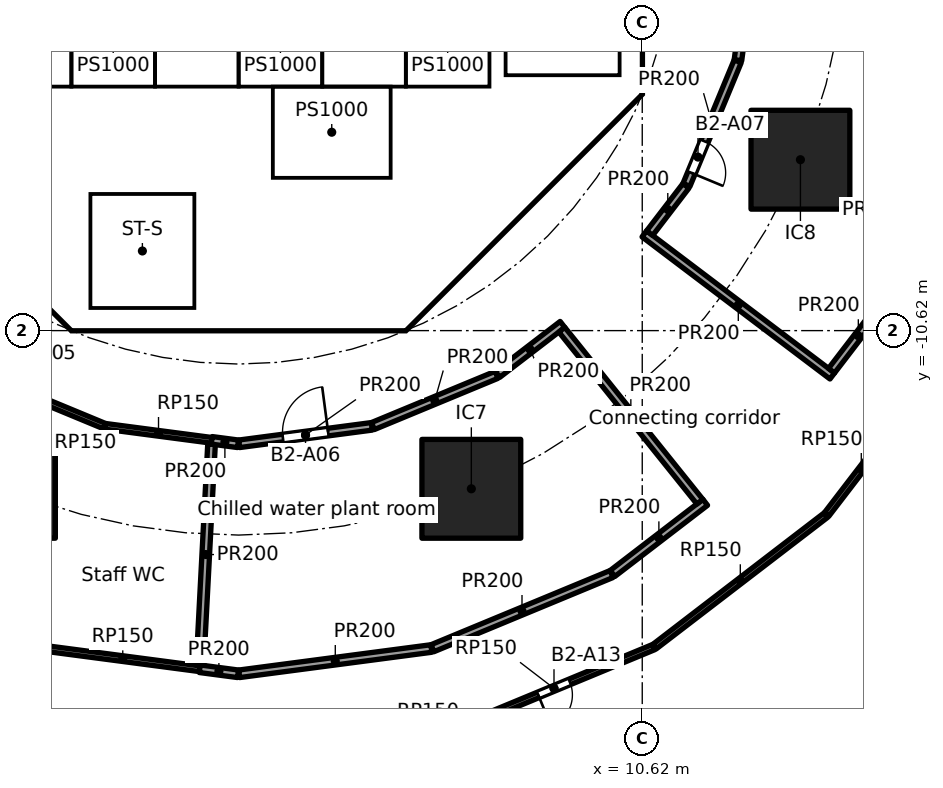
"""IFC4 building model, lengths in metres.
Left out: names, types, materials, properties, quantities, classifications, styles, units other than length and angle.
Written with IfcOpenShell. Run it as: python <this file> out.ifc"""

import sys

from ifc_helpers import new_model, si_unit, direction, frame, frame_2d, origin, origin_2d, place, context, subcontext, project, spatial, polyline, rectangle, outline, extrude, element, fill, save


model = new_model("IFC4")
c1 = context("Model", 3, precision=1e-05, world=origin(), true_north=direction((0.0, 1.0)))
c2 = subcontext(c1, "Body", "Model", "MODEL_VIEW")
j1 = project(units=[si_unit("LENGTHUNIT", "METRE"), si_unit("PLANEANGLEUNIT", "RADIAN")], contexts=[c1])
p1 = place(None, origin())
s1 = spatial("IfcSite", under=j1, at=p1, CompositionType="ELEMENT")
p2 = place(p1, origin())
s2 = spatial("IfcBuilding", under=s1, at=p2, CompositionType="ELEMENT")
p3 = place(p2, frame((0.0, 0.0, -10.0)))
s3 = spatial("IfcBuildingStorey", under=s2, at=p3, CompositionType="ELEMENT", Elevation=-10.0)
for number, where, z_axis, x_axis in (
    (1, (-6.123, -14.782, 0.0), (0.0, 0.0, 1.0), (1.0, 0.0, 0.0)),
    (2, (6.123, -14.782, 0.0), (0.0, 0.0, 1.0), (1.0, 0.0, 0.0)),
    (3, (14.782, -6.123, 0.0), (0.0, 0.0, 1.0), (1.0, 0.0, 0.0)),
):
    element("IfcColumn", number, at=place(p3, frame(where, z_axis=z_axis, x_axis=x_axis)), inside=s3, PredefinedType="COLUMN", context=c2, shape_type="SweptSolid", body=[
        extrude(rectangle(XDim=2.6, YDim=2.6, at=origin_2d()), origin(), (0.0, 0.0, 1.0), 5.0),
    ])
p4 = place(p3, frame((-9.988, -4.613, 0.0), z_axis=(0.0, 0.0, 1.0), x_axis=(0.707106781187, -0.707106781187, 0.0)))
e4 = element("IfcWall", 4, at=p4, inside=s3, PredefinedType="SHEAR", context=c2, shape_type="SweptSolid", body=[
    extrude(rectangle(XDim=7.602, YDim=0.6, at=frame_2d((3.801, 0.0))), origin(), (0.0, 0.0, 1.0), 4.6),
])
p5 = place(p4, frame((6.151, 0.0, 0.0)))
e5 = element("IfcOpeningElement", 5, at=p5, cuts=e4, PredefinedType="OPENING", context=c2, shape_type="SweptSolid", body=[
    extrude(rectangle(XDim=1.1, YDim=2.1, at=frame_2d((0.55, 1.05))), frame((0.0, 0.31, 0.0), z_axis=(0.0, -1.0, 0.0), x_axis=(1.0, 0.0, 0.0)), (0.0, 0.0, 1.0), 0.62),
])
p6 = place(p3, frame((4.613, -9.988, 0.0), z_axis=(0.0, 0.0, 1.0), x_axis=(0.707106781187, 0.707106781187, 0.0)))
e6 = element("IfcWall", 6, at=p6, inside=s3, PredefinedType="SHEAR", context=c2, shape_type="SweptSolid", body=[
    extrude(rectangle(XDim=7.602, YDim=0.6, at=frame_2d((3.801, 0.0))), origin(), (0.0, 0.0, 1.0), 4.6),
])
p7 = place(p6, frame((3.201, 0.0, 0.0)))
e7 = element("IfcOpeningElement", 7, at=p7, cuts=e6, PredefinedType="OPENING", context=c2, shape_type="SweptSolid", body=[
    extrude(rectangle(XDim=1.2, YDim=2.1, at=frame_2d((0.6, 1.05))), frame((0.0, 0.31, 0.0), z_axis=(0.0, -1.0, 0.0), x_axis=(1.0, 0.0, 0.0)), (0.0, 0.0, 1.0), 0.62),
])
p8 = place(p3, frame((4.0, -10.025, 0.0), z_axis=(0.0, 0.0, 1.0), x_axis=(0.0, 1.0, 0.0)))
e8 = element("IfcWall", 8, at=p8, inside=s3, PredefinedType="SOLIDWALL", context=c2, shape_type="SweptSolid", body=[
    extrude(rectangle(XDim=3.0, YDim=0.2, at=frame_2d((1.5, 0.0))), origin(), (0.0, 0.0, 1.0), 4.6),
])
p9 = place(p8, frame((0.975, 0.0, 0.0)))
e9 = element("IfcOpeningElement", 9, at=p9, cuts=e8, PredefinedType="OPENING", context=c2, shape_type="SweptSolid", body=[
    extrude(rectangle(XDim=1.1, YDim=2.1, at=frame_2d((0.55, 1.05))), frame((0.0, 0.11, 0.0), z_axis=(0.0, -1.0, 0.0), x_axis=(1.0, 0.0, 0.0)), (0.0, 0.0, 1.0), 0.22),
])
p10 = place(p3, frame((4.0, -6.5, 0.0), z_axis=(0.0, 0.0, 1.0), x_axis=(0.0, 1.0, 0.0)))
e10 = element("IfcWall", 10, at=p10, inside=s3, PredefinedType="SOLIDWALL", context=c2, shape_type="SweptSolid", body=[
    extrude(rectangle(XDim=2.2, YDim=0.2, at=frame_2d((1.1, 0.0))), origin(), (0.0, 0.0, 1.0), 4.6),
])
p11 = place(p10, frame((0.55, 0.0, 0.0)))
e11 = element("IfcOpeningElement", 11, at=p11, cuts=e10, PredefinedType="OPENING", context=c2, shape_type="SweptSolid", body=[
    extrude(rectangle(XDim=1.1, YDim=2.1, at=frame_2d((0.55, 1.05))), frame((0.0, 0.11, 0.0), z_axis=(0.0, -1.0, 0.0), x_axis=(1.0, 0.0, 0.0)), (0.0, 0.0, 1.0), 0.22),
])
p12 = place(p3, frame((-4.0, -6.5, 0.0), z_axis=(0.0, 0.0, 1.0), x_axis=(0.0, 1.0, 0.0)))
e12 = element("IfcWall", 12, at=p12, inside=s3, PredefinedType="SOLIDWALL", context=c2, shape_type="SweptSolid", body=[
    extrude(rectangle(XDim=2.2, YDim=0.2, at=frame_2d((1.1, 0.0))), origin(), (0.0, 0.0, 1.0), 4.6),
])
p13 = place(p12, frame((0.65, 0.0, 0.0)))
e13 = element("IfcOpeningElement", 13, at=p13, cuts=e12, PredefinedType="OPENING", context=c2, shape_type="SweptSolid", body=[
    extrude(rectangle(XDim=0.9, YDim=2.1, at=frame_2d((0.45, 1.05))), frame((0.0, 0.11, 0.0), z_axis=(0.0, -1.0, 0.0), x_axis=(1.0, 0.0, 0.0)), (0.0, 0.0, 1.0), 0.22),
])
p14 = place(p3, origin())
e14 = element("IfcWall", 14, at=p14, inside=s3, PredefinedType="SHEAR", context=c2, shape_type="SweptSolid", body=[
    extrude(outline(polyline([(-4.152, -10.025), (4.152, -10.025), (4.401, -9.776), (4.825, -10.2), (4.401, -10.625), (-4.401, -10.625), (-4.825, -10.2), (-4.401, -9.776), (-4.152, -10.025)])), origin(), (0.0, 0.0, 1.0), 4.6),
])
p15 = place(p3, origin())
e15 = element("IfcWall", 15, at=p15, inside=s3, PredefinedType="SHEAR", context=c2, shape_type="SweptSolid", body=[
    extrude(outline(polyline([(9.776, -4.401), (10.025, -4.152), (10.025, -3.801), (10.025, 4.152), (9.776, 4.401), (10.2, 4.825), (10.625, 4.401), (10.625, -4.401), (10.2, -4.825), (9.776, -4.401)])), origin(), (0.0, 0.0, 1.0), 4.6),
])
for number, where, z_axis, x_axis in (
    (16, (-0.9, -6.5, 0.0), (0.0, 0.0, 1.0), (0.0, 1.0, 0.0)),
    (17, (0.9, -6.5, 0.0), (0.0, 0.0, 1.0), (0.0, 1.0, 0.0)),
):
    element("IfcWall", number, at=place(p3, frame(where, z_axis=z_axis, x_axis=x_axis)), inside=s3, PredefinedType="SOLIDWALL", context=c2, shape_type="SweptSolid", body=[
        extrude(rectangle(XDim=2.2, YDim=0.2, at=frame_2d((1.1, 0.0))), origin(), (0.0, 0.0, 1.0), 4.6),
    ])
p16 = place(p3, origin())
e18 = element("IfcWall", 18, at=p16, inside=s3, PredefinedType="SOLIDWALL", context=c2, shape_type="SweptSolid", body=[
    extrude(outline(polyline([(-6.7, -2.1), (-6.5, -2.1), (-6.5, -4.1), (-4.5, -4.1), (-4.5, -2.1), (-4.3, -2.1), (-4.3, -4.1), (-2.3, -4.1), (-2.3, -2.1), (-2.1, -2.1), (-2.1, -4.1), (-0.1, -4.1), (-0.1, -2.1), (0.1, -2.1), (0.1, -4.1), (2.1, -4.1), (2.1, -2.1), (2.3, -2.1), (2.3, -4.1), (4.3, -4.1), (4.3, -2.1), (4.5, -2.1), (4.5, -4.1), (6.5, -4.1), (6.5, -2.1), (6.7, -2.1), (6.7, -4.3), (-6.7, -4.3), (-6.7, -2.1)])), origin(), (0.0, 0.0, 1.0), 4.6),
])
p17 = place(p3, origin())
e19 = element("IfcWall", 19, at=p17, inside=s3, PredefinedType="SOLIDWALL", context=c2, shape_type="SweptSolid", body=[
    extrude(outline(polyline([(-3.9, -10.025), (-4.1, -10.025), (-4.1, -7.025), (-3.9, -7.025), (-3.9, -10.025)])), origin(), (0.0, 0.0, 1.0), 4.6),
])
p18 = place(p3, origin())
e20 = element("IfcWall", 20, at=p18, inside=s3, PredefinedType="SOLIDWALL", context=c2, shape_type="SweptSolid", body=[
    extrude(outline(polyline([(4.1, -7.025), (-4.1, -7.025), (-4.1, -6.5), (4.1, -6.5), (4.1, -7.025)])), origin(), (0.0, 0.0, 1.0), 4.6),
])
p19 = place(p3, origin())
e21 = element("IfcWall", 21, at=p19, inside=s3, PredefinedType="SOLIDWALL", context=c2, shape_type="SweptSolid", body=[
    extrude(outline(polyline([(7.025, -3.9), (6.7, -3.9), (6.7, 3.9), (7.025, 3.9), (7.025, -3.9)])), origin(), (0.0, 0.0, 1.0), 4.6),
])
p20 = place(p3, origin())
e22 = element("IfcWall", 22, at=p20, inside=s3, PredefinedType="SOLIDWALL", context=c2, shape_type="SweptSolid", body=[
    extrude(outline(polyline([(10.025, -4.1), (6.7, -4.1), (6.7, -3.9), (10.025, -3.9), (10.025, -4.1)])), origin(), (0.0, 0.0, 1.0), 4.6),
])
p21 = place(p3, frame((0.0, 0.0, -2.0)))
e23 = element("IfcWall", 23, at=p21, inside=s3, PredefinedType="SOLIDWALL", context=c2, shape_type="SweptSolid", body=[
    extrude(outline(polyline([(-4.4, -4.2), (-6.6, -4.2), (-6.6, -2.0), (-4.4, -2.0), (-4.4, -4.2)]), holes=[polyline([(-4.5, -4.1), (-4.5, -2.1), (-6.5, -2.1), (-6.5, -4.1), (-4.5, -4.1)])]), origin(), (0.0, 0.0, 1.0), 2.0),
])
p22 = place(p3, frame((0.0, 0.0, -2.0)))
e24 = element("IfcWall", 24, at=p22, inside=s3, PredefinedType="SOLIDWALL", context=c2, shape_type="SweptSolid", body=[
    extrude(outline(polyline([(-2.2, -4.2), (-4.4, -4.2), (-4.4, -2.0), (-2.2, -2.0), (-2.2, -4.2)]), holes=[polyline([(-2.3, -4.1), (-2.3, -2.1), (-4.3, -2.1), (-4.3, -4.1), (-2.3, -4.1)])]), origin(), (0.0, 0.0, 1.0), 2.0),
])
p23 = place(p3, frame((0.0, 0.0, -2.0)))
e25 = element("IfcWall", 25, at=p23, inside=s3, PredefinedType="SOLIDWALL", context=c2, shape_type="SweptSolid", body=[
    extrude(outline(polyline([(0.0, -4.2), (-2.2, -4.2), (-2.2, -2.0), (0.0, -2.0), (0.0, -4.2)]), holes=[polyline([(-0.1, -4.1), (-0.1, -2.1), (-2.1, -2.1), (-2.1, -4.1), (-0.1, -4.1)])]), origin(), (0.0, 0.0, 1.0), 2.0),
])
p24 = place(p3, frame((0.0, 0.0, -2.0)))
e26 = element("IfcWall", 26, at=p24, inside=s3, PredefinedType="SOLIDWALL", context=c2, shape_type="SweptSolid", body=[
    extrude(outline(polyline([(2.2, -4.2), (0.0, -4.2), (0.0, -2.0), (2.2, -2.0), (2.2, -4.2)]), holes=[polyline([(2.1, -4.1), (2.1, -2.1), (0.1, -2.1), (0.1, -4.1), (2.1, -4.1)])]), origin(), (0.0, 0.0, 1.0), 2.0),
])
p25 = place(p3, frame((0.0, 0.0, -2.0)))
e27 = element("IfcWall", 27, at=p25, inside=s3, PredefinedType="SOLIDWALL", context=c2, shape_type="SweptSolid", body=[
    extrude(outline(polyline([(4.4, -4.2), (2.2, -4.2), (2.2, -2.0), (4.4, -2.0), (4.4, -4.2)]), holes=[polyline([(4.3, -4.1), (4.3, -2.1), (2.3, -2.1), (2.3, -4.1), (4.3, -4.1)])]), origin(), (0.0, 0.0, 1.0), 2.0),
])
p26 = place(p3, frame((0.0, 0.0, -2.0)))
e28 = element("IfcWall", 28, at=p26, inside=s3, PredefinedType="SOLIDWALL", context=c2, shape_type="SweptSolid", body=[
    extrude(outline(polyline([(6.6, -4.2), (4.4, -4.2), (4.4, -2.0), (6.6, -2.0), (6.6, -4.2)]), holes=[polyline([(6.5, -4.1), (6.5, -2.1), (4.5, -2.1), (4.5, -4.1), (6.5, -4.1)])]), origin(), (0.0, 0.0, 1.0), 2.0),
])
p27 = place(p3, frame((0.0, 0.0, -2.0)))
e29 = element("IfcWall", 29, at=p27, inside=s3, PredefinedType="SOLIDWALL", context=c2, shape_type="SweptSolid", body=[
    extrude(outline(polyline([(4.0, -6.6), (0.9, -6.6), (0.9, -4.2), (4.0, -4.2), (4.0, -6.6)]), holes=[polyline([(3.9, -6.5), (3.9, -4.3), (1.0, -4.3), (1.0, -6.5), (3.9, -6.5)])]), origin(), (0.0, 0.0, 1.0), 2.0),
])
p28 = place(p3, frame((-5.074, -18.984, 0.0), z_axis=(0.0, 0.0, 1.0), x_axis=(0.991443107789, -0.13053951133, 0.0)))
e30 = element("IfcWall", 30, at=p28, inside=s3, PredefinedType="PARTITIONING", context=c2, shape_type="SweptSolid", body=[
    extrude(rectangle(XDim=4.086, YDim=0.15, at=frame_2d((2.043, 0.0))), origin(), (0.0, 0.0, 1.0), 4.6),
])
p29 = place(p3, frame((-3.531, -13.132, 0.0), z_axis=(0.0, 0.0, 1.0), x_axis=(-0.923881838111, 0.382677866108, 0.0)))
e31 = element("IfcWall", 31, at=p29, inside=s3, PredefinedType="PARTITIONING", context=c2, shape_type="SweptSolid", body=[
    extrude(rectangle(XDim=3.527, YDim=0.15, at=frame_2d((1.763, 0.0))), origin(), (0.0, 0.0, 1.0), 4.6),
])
p30 = place(p29, frame((2.281, 0.0, 0.0)))
e32 = element("IfcOpeningElement", 32, at=p30, cuts=e31, PredefinedType="OPENING", context=c2, shape_type="SweptSolid", body=[
    extrude(rectangle(XDim=0.9, YDim=2.1, at=frame_2d((0.45, 1.05))), frame((0.0, 0.085, 0.0), z_axis=(0.0, -1.0, 0.0), x_axis=(1.0, 0.0, 0.0)), (0.0, 0.0, 1.0), 0.17),
])
p31 = place(p3, frame((-0.708, -13.507, 0.0), z_axis=(0.0, 0.0, 1.0), x_axis=(-0.991443994311, 0.130532778046, 0.0)))
e33 = element("IfcWall", 33, at=p31, inside=s3, PredefinedType="PARTITIONING", context=c2, shape_type="SweptSolid", body=[
    extrude(rectangle(XDim=2.824, YDim=0.15, at=frame_2d((1.412, 0.0))), origin(), (0.0, 0.0, 1.0), 4.6),
])
p32 = place(p3, frame((10.924, -18.945, 0.0), z_axis=(0.0, 0.0, 1.0), x_axis=(-0.923876568882, -0.38269058712, 0.0)))
e34 = element("IfcWall", 34, at=p32, inside=s3, PredefinedType="PARTITIONING", context=c2, shape_type="SweptSolid", body=[
    extrude(rectangle(XDim=5.686, YDim=0.15, at=frame_2d((2.843, 0.0))), origin(), (0.0, 0.0, 1.0), 4.6),
])
p33 = place(p32, frame((2.393, 0.0, 0.0)))
e35 = element("IfcOpeningElement", 35, at=p33, cuts=e34, PredefinedType="OPENING", context=c2, shape_type="SweptSolid", body=[
    extrude(rectangle(XDim=0.9, YDim=2.1, at=frame_2d((0.45, 1.05))), frame((0.0, 0.085, 0.0), z_axis=(0.0, -1.0, 0.0), x_axis=(1.0, 0.0, 0.0)), (0.0, 0.0, 1.0), 0.17),
])
p34 = place(p3, frame((15.456, -15.472, 0.0), z_axis=(0.0, 0.0, 1.0), x_axis=(-0.793356107398, -0.608757822828, 0.0)))
e36 = element("IfcWall", 36, at=p34, inside=s3, PredefinedType="PARTITIONING", context=c2, shape_type="SweptSolid", body=[
    extrude(rectangle(XDim=5.686, YDim=0.15, at=frame_2d((2.843, 0.0))), origin(), (0.0, 0.0, 1.0), 4.6),
])
p35 = place(p3, frame((17.295, -13.08, 0.0), z_axis=(0.0, 0.0, 1.0), x_axis=(-0.608756728417, -0.79335694716, 0.0)))
e37 = element("IfcWall", 37, at=p35, inside=s3, PredefinedType="PARTITIONING", context=c2, shape_type="SweptSolid", body=[
    extrude(rectangle(XDim=2.994, YDim=0.15, at=frame_2d((1.497, 0.0))), origin(), (0.0, 0.0, 1.0), 4.6),
])
p36 = place(p3, frame((-1.023, -19.517, 0.0), z_axis=(0.0, 0.0, 1.0), x_axis=(0.991428116695, -0.130653317704, 0.0)))
e38 = element("IfcWall", 38, at=p36, inside=s3, PredefinedType="PARTITIONING", context=c2, shape_type="SweptSolid", body=[
    extrude(rectangle(XDim=1.017, YDim=0.2, at=frame_2d((0.508, 0.0))), origin(), (0.0, 0.0, 1.0), 4.6),
])
p37 = place(p3, frame((-0.713, -13.607, 0.0), z_axis=(0.0, 0.0, 1.0), x_axis=(-0.052327572808, -0.998629974077, 0.0)))
e39 = element("IfcWall", 39, at=p37, inside=s3, PredefinedType="PARTITIONING", context=c2, shape_type="SweptSolid", body=[
    extrude(rectangle(XDim=5.818, YDim=0.2, at=frame_2d((2.909, 0.0))), origin(), (0.0, 0.0, 1.0), 4.6),
])
p38 = place(p3, frame((0.015, -19.65, 0.0), z_axis=(0.0, 0.0, 1.0), x_axis=(0.991441907417, 0.13054862779, 0.0)))
e40 = element("IfcWall", 40, at=p38, inside=s3, PredefinedType="PARTITIONING", context=c2, shape_type="SweptSolid", body=[
    extrude(rectangle(XDim=5.1, YDim=0.2, at=frame_2d((2.55, 0.0))), origin(), (0.0, 0.0, 1.0), 4.6),
])
p39 = place(p3, frame((-0.015, -13.598, 0.0), z_axis=(0.0, 0.0, 1.0), x_axis=(-0.991473310532, 0.130309917135, 0.0)))
e41 = element("IfcWall", 41, at=p39, inside=s3, PredefinedType="PARTITIONING", context=c2, shape_type="SweptSolid", body=[
    extrude(rectangle(XDim=0.699, YDim=0.2, at=frame_2d((0.349, 0.0))), origin(), (0.0, 0.0, 1.0), 4.6),
])
p40 = place(p3, frame((3.505, -13.139, 0.0), z_axis=(0.0, 0.0, 1.0), x_axis=(-0.991452406768, -0.130468866457, 0.0)))
e42 = element("IfcWall", 42, at=p40, inside=s3, PredefinedType="PARTITIONING", context=c2, shape_type="SweptSolid", body=[
    extrude(rectangle(XDim=3.52, YDim=0.2, at=frame_2d((1.76, 0.0))), origin(), (0.0, 0.0, 1.0), 4.6),
])
p41 = place(p40, frame((1.16, 0.0, 0.0)))
e43 = element("IfcOpeningElement", 43, at=p41, cuts=e42, PredefinedType="OPENING", context=c2, shape_type="SweptSolid", body=[
    extrude(rectangle(XDim=1.2, YDim=2.1, at=frame_2d((0.6, 1.05))), frame((0.0, 0.11, 0.0), z_axis=(0.0, -1.0, 0.0), x_axis=(1.0, 0.0, 0.0)), (0.0, 0.0, 1.0), 0.22),
])
p42 = place(p3, frame((5.1, -18.976, 0.0), z_axis=(0.0, 0.0, 1.0), x_axis=(0.9238779676, 0.382687210373, 0.0)))
e44 = element("IfcWall", 44, at=p42, inside=s3, PredefinedType="PARTITIONING", context=c2, shape_type="SweptSolid", body=[
    extrude(rectangle(XDim=5.1, YDim=0.2, at=frame_2d((2.55, 0.0))), origin(), (0.0, 0.0, 1.0), 4.6),
])
p43 = place(p3, frame((6.786, -11.784, 0.0), z_axis=(0.0, 0.0, 1.0), x_axis=(-0.92386297064, -0.382723413813, 0.0)))
e45 = element("IfcWall", 45, at=p43, inside=s3, PredefinedType="PARTITIONING", context=c2, shape_type="SweptSolid", body=[
    extrude(rectangle(XDim=3.52, YDim=0.2, at=frame_2d((1.76, 0.0))), origin(), (0.0, 0.0, 1.0), 4.6),
])
p44 = place(p3, frame((8.521, -10.457, 0.0), z_axis=(0.0, 0.0, 1.0), x_axis=(-0.793411148419, -0.608686084582, 0.0)))
e46 = element("IfcWall", 46, at=p44, inside=s3, PredefinedType="PARTITIONING", context=c2, shape_type="SweptSolid", body=[
    extrude(rectangle(XDim=2.154, YDim=0.2, at=frame_2d((1.077, 0.0))), origin(), (0.0, 0.0, 1.0), 4.6),
])
p45 = place(p3, frame((9.838, -17.01, 0.0), z_axis=(0.0, 0.0, 1.0), x_axis=(0.793349451978, 0.608766496324, 0.0)))
e47 = element("IfcWall", 47, at=p45, inside=s3, PredefinedType="PARTITIONING", context=c2, shape_type="SweptSolid", body=[
    extrude(rectangle(XDim=3.075, YDim=0.2, at=frame_2d((1.538, 0.0))), origin(), (0.0, 0.0, 1.0), 4.6),
])
p46 = place(p3, frame((10.675, -8.073, 0.0), z_axis=(0.0, 0.0, 1.0), x_axis=(0.797578930951, -0.603214596062, 0.0)))
e48 = element("IfcWall", 48, at=p46, inside=s3, PredefinedType="PARTITIONING", context=c2, shape_type="SweptSolid", body=[
    extrude(rectangle(XDim=6.2, YDim=0.2, at=frame_2d((3.1, 0.0))), origin(), (0.0, 0.0, 1.0), 4.6),
])
p47 = place(p3, frame((11.769, -6.812, 0.0), z_axis=(0.0, 0.0, 1.0), x_axis=(-0.608670453571, -0.793423139913, 0.0)))
e49 = element("IfcWall", 49, at=p47, inside=s3, PredefinedType="PARTITIONING", context=c2, shape_type="SweptSolid", body=[
    extrude(rectangle(XDim=1.566, YDim=0.2, at=frame_2d((0.783, 0.0))), origin(), (0.0, 0.0, 1.0), 4.6),
])
p48 = place(p3, frame((12.136, -15.121, 0.0), z_axis=(0.0, 0.0, 1.0), x_axis=(-0.625936206577, 0.779874262491, 0.0)))
e50 = element("IfcWall", 50, at=p48, inside=s3, PredefinedType="PARTITIONING", context=c2, shape_type="SweptSolid", body=[
    extrude(rectangle(XDim=5.802, YDim=0.2, at=frame_2d((2.901, 0.0))), origin(), (0.0, 0.0, 1.0), 4.6),
])
p49 = place(p3, frame((13.131, -3.534, 0.0), z_axis=(0.0, 0.0, 1.0), x_axis=(-0.382723413813, -0.92386297064, 0.0)))
e51 = element("IfcWall", 51, at=p49, inside=s3, PredefinedType="PARTITIONING", context=c2, shape_type="SweptSolid", body=[
    extrude(rectangle(XDim=3.52, YDim=0.2, at=frame_2d((1.76, 0.0))), origin(), (0.0, 0.0, 1.0), 4.6),
])
p50 = place(p49, frame((2.278, 0.0, 0.0)))
e52 = element("IfcOpeningElement", 52, at=p50, cuts=e51, PredefinedType="OPENING", context=c2, shape_type="SweptSolid", body=[
    extrude(rectangle(XDim=0.9, YDim=2.1, at=frame_2d((0.45, 1.05))), frame((0.0, 0.11, 0.0), z_axis=(0.0, -1.0, 0.0), x_axis=(1.0, 0.0, 0.0)), (0.0, 0.0, 1.0), 0.22),
])
p51 = place(p3, frame((13.598, -0.015, 0.0), z_axis=(0.0, 0.0, 1.0), x_axis=(-0.130468866457, -0.991452406768, 0.0)))
e53 = element("IfcWall", 53, at=p51, inside=s3, PredefinedType="PARTITIONING", context=c2, shape_type="SweptSolid", body=[
    extrude(rectangle(XDim=3.52, YDim=0.2, at=frame_2d((1.76, 0.0))), origin(), (0.0, 0.0, 1.0), 4.6),
])
p52 = place(p3, frame((15.601, -11.674, 0.0), z_axis=(0.0, 0.0, 1.0), x_axis=(0.608741577542, 0.793368572463, 0.0)))
e54 = element("IfcWall", 54, at=p52, inside=s3, PredefinedType="PARTITIONING", context=c2, shape_type="SweptSolid", body=[
    extrude(rectangle(XDim=2.314, YDim=0.2, at=frame_2d((1.157, 0.0))), origin(), (0.0, 0.0, 1.0), 4.6),
])
p53 = place(p11, origin())
e55 = element("IfcDoor", 55, at=p53, inside=s3, OperationType="DOUBLE_DOOR_SLIDING", PredefinedType="DOOR", context=c2, shape_type="SweptSolid", body=[
    extrude(rectangle(XDim=1.1, YDim=2.1, at=frame_2d((0.55, 1.05))), frame((0.0, 0.025, 0.0), z_axis=(0.0, -1.0, 0.0), x_axis=(1.0, 0.0, 0.0)), (0.0, 0.0, 1.0), 0.05),
])
fill(e11, e55)
p54 = place(p9, origin())
e56 = element("IfcDoor", 56, at=p54, inside=s3, OperationType="SINGLE_SWING_RIGHT", PredefinedType="DOOR", context=c2, shape_type="SweptSolid", body=[
    extrude(rectangle(XDim=1.1, YDim=2.1, at=frame_2d((0.55, 1.05))), frame((0.0, 0.025, 0.0), z_axis=(0.0, -1.0, 0.0), x_axis=(1.0, 0.0, 0.0)), (0.0, 0.0, 1.0), 0.05),
])
fill(e9, e56)
p55 = place(p13, frame((0.9, 0.0, 0.0), x_axis=(-1.0, 0.0, 0.0)))
e57 = element("IfcDoor", 57, at=p55, inside=s3, OperationType="SINGLE_SWING_LEFT", PredefinedType="DOOR", context=c2, shape_type="SweptSolid", body=[
    extrude(rectangle(XDim=0.9, YDim=2.1, at=frame_2d((0.45, 1.05))), frame((0.0, 0.025, 0.0), z_axis=(0.0, -1.0, 0.0), x_axis=(1.0, 0.0, 0.0)), (0.0, 0.0, 1.0), 0.05),
])
fill(e13, e57)
p56 = place(p7, origin())
e58 = element("IfcDoor", 58, at=p56, inside=s3, OperationType="SINGLE_SWING_LEFT", PredefinedType="DOOR", context=c2, shape_type="SweptSolid", body=[
    extrude(rectangle(XDim=1.2, YDim=2.1, at=frame_2d((0.6, 1.05))), frame((0.0, 0.025, 0.0), z_axis=(0.0, -1.0, 0.0), x_axis=(1.0, 0.0, 0.0)), (0.0, 0.0, 1.0), 0.05),
])
fill(e7, e58)
p57 = place(p5, origin())
e59 = element("IfcDoor", 59, at=p57, inside=s3, OperationType="SINGLE_SWING_LEFT", PredefinedType="DOOR", context=c2, shape_type="SweptSolid", body=[
    extrude(rectangle(XDim=1.1, YDim=2.1, at=frame_2d((0.55, 1.05))), frame((0.0, 0.025, 0.0), z_axis=(0.0, -1.0, 0.0), x_axis=(1.0, 0.0, 0.0)), (0.0, 0.0, 1.0), 0.05),
])
fill(e5, e59)
p58 = place(p41, frame((1.2, 0.0, 0.0), x_axis=(-1.0, 0.0, 0.0)))
e60 = element("IfcDoor", 60, at=p58, inside=s3, OperationType="SINGLE_SWING_RIGHT", PredefinedType="DOOR", context=c2, shape_type="SweptSolid", body=[
    extrude(rectangle(XDim=1.2, YDim=2.1, at=frame_2d((0.6, 1.05))), frame((0.0, 0.025, 0.0), z_axis=(0.0, -1.0, 0.0), x_axis=(1.0, 0.0, 0.0)), (0.0, 0.0, 1.0), 0.05),
])
fill(e43, e60)
p59 = place(p50, origin())
e61 = element("IfcDoor", 61, at=p59, inside=s3, OperationType="SINGLE_SWING_RIGHT", PredefinedType="DOOR", context=c2, shape_type="SweptSolid", body=[
    extrude(rectangle(XDim=0.9, YDim=2.1, at=frame_2d((0.45, 1.05))), frame((0.0, 0.025, 0.0), z_axis=(0.0, -1.0, 0.0), x_axis=(1.0, 0.0, 0.0)), (0.0, 0.0, 1.0), 0.05),
])
fill(e52, e61)
p60 = place(p33, origin())
e62 = element("IfcDoor", 62, at=p60, inside=s3, OperationType="SINGLE_SWING_RIGHT", PredefinedType="DOOR", context=c2, shape_type="SweptSolid", body=[
    extrude(rectangle(XDim=0.9, YDim=2.1, at=frame_2d((0.45, 1.05))), frame((0.0, 0.025, 0.0), z_axis=(0.0, -1.0, 0.0), x_axis=(1.0, 0.0, 0.0)), (0.0, 0.0, 1.0), 0.05),
])
fill(e35, e62)
save(model, sys.argv[1])
